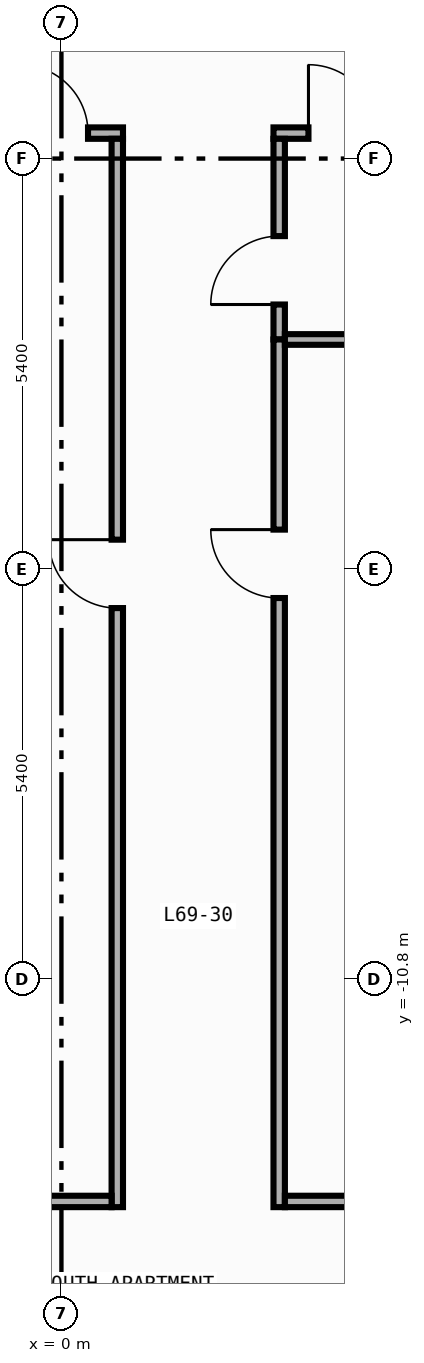
"""IFC4 building model, lengths in metres.
Left out: names, types, materials, properties, quantities, classifications, styles, units other than length and angle.
Written with IfcOpenShell. Run it as: python <this file> out.ifc"""

import sys

from ifc_helpers import new_model, si_unit, direction, frame, frame_2d, origin, place, context, subcontext, project, spatial, rectangle, extrude, element, fill, save


model = new_model("IFC4")
c1 = context("Model", 3, precision=1e-05, world=origin(), true_north=direction((0.0, 1.0)))
c2 = subcontext(c1, "Body", "Model", "MODEL_VIEW")
j1 = project(units=[si_unit("LENGTHUNIT", "METRE"), si_unit("PLANEANGLEUNIT", "RADIAN")], contexts=[c1])
p1 = place(None, origin())
s1 = spatial("IfcSite", under=j1, at=p1, CompositionType="ELEMENT")
p2 = place(p1, origin())
s2 = spatial("IfcBuilding", under=s1, at=p2, CompositionType="ELEMENT")
p3 = place(p2, frame((0.0, 0.0, 289.0)))
s3 = spatial("IfcBuildingStorey", under=s2, at=p3, CompositionType="ELEMENT", Elevation=289.0)
p4 = place(p3, frame((-10.025, 0.335, 0.0), z_axis=(0.0, 0.0, 1.0), x_axis=(1.0, 0.0, 0.0)))
e1 = element("IfcWall", 1, at=p4, inside=s3, PredefinedType="PARTITIONING", context=c2, shape_type="SweptSolid", body=[
    extrude(rectangle(XDim=10.835, YDim=0.15, at=frame_2d((5.417, 0.0))), origin(), (0.0, 0.0, 1.0), 2.64),
])
p5 = place(p4, frame((9.475, 0.0, 0.0)))
e2 = element("IfcOpeningElement", 2, at=p5, cuts=e1, PredefinedType="OPENING", context=c2, shape_type="SweptSolid", body=[
    extrude(rectangle(XDim=0.9, YDim=2.15, at=frame_2d((0.45, 1.075))), frame((0.0, 0.085, 0.0), z_axis=(0.0, -1.0, 0.0), x_axis=(1.0, 0.0, 0.0)), (0.0, 0.0, 1.0), 0.17),
])
p6 = place(p3, frame((2.79, 0.335, 0.0), z_axis=(0.0, 0.0, 1.0), x_axis=(1.0, 0.0, 0.0)))
e3 = element("IfcWall", 3, at=p6, inside=s3, PredefinedType="PARTITIONING", context=c2, shape_type="SweptSolid", body=[
    extrude(rectangle(XDim=3.05, YDim=0.15, at=frame_2d((1.525, 0.0))), origin(), (0.0, 0.0, 1.0), 2.64),
])
p7 = place(p6, frame((0.46, 0.0, 0.0)))
e4 = element("IfcOpeningElement", 4, at=p7, cuts=e3, PredefinedType="OPENING", context=c2, shape_type="SweptSolid", body=[
    extrude(rectangle(XDim=0.9, YDim=2.15, at=frame_2d((0.45, 1.075))), frame((0.0, 0.085, 0.0), z_axis=(0.0, -1.0, 0.0), x_axis=(1.0, 0.0, 0.0)), (0.0, 0.0, 1.0), 0.17),
])
p8 = place(p3, frame((0.735, -13.795, 0.0), z_axis=(0.0, 0.0, 1.0), x_axis=(0.0, 1.0, 0.0)))
e5 = element("IfcWall", 5, at=p8, inside=s3, PredefinedType="PARTITIONING", context=c2, shape_type="SweptSolid", body=[
    extrude(rectangle(XDim=14.055, YDim=0.15, at=frame_2d((7.027, 0.0))), origin(), (0.0, 0.0, 1.0), 3.54),
])
p9 = place(p8, frame((7.881, 0.0, 0.0)))
e6 = element("IfcOpeningElement", 6, at=p9, cuts=e5, PredefinedType="OPENING", context=c2, shape_type="SweptSolid", body=[
    extrude(rectangle(XDim=0.9, YDim=2.15, at=frame_2d((0.45, 1.075))), frame((0.0, 0.085, 0.0), z_axis=(0.0, -1.0, 0.0), x_axis=(1.0, 0.0, 0.0)), (0.0, 0.0, 1.0), 0.17),
])
p10 = place(p3, frame((2.865, -2.38, 0.0), z_axis=(0.0, 0.0, 1.0), x_axis=(0.0, 1.0, 0.0)))
e7 = element("IfcWall", 7, at=p10, inside=s3, PredefinedType="PARTITIONING", context=c2, shape_type="SweptSolid", body=[
    extrude(rectangle(XDim=2.64, YDim=0.15, at=frame_2d((1.32, 0.0))), origin(), (0.0, 0.0, 1.0), 3.54),
])
p11 = place(p10, frame((0.46, 0.0, 0.0)))
e8 = element("IfcOpeningElement", 8, at=p11, cuts=e7, PredefinedType="OPENING", context=c2, shape_type="SweptSolid", body=[
    extrude(rectangle(XDim=0.9, YDim=2.15, at=frame_2d((0.45, 1.075))), frame((0.0, 0.085, 0.0), z_axis=(0.0, -1.0, 0.0), x_axis=(1.0, 0.0, 0.0)), (0.0, 0.0, 1.0), 0.17),
])
p12 = place(p3, frame((2.865, -13.795, 0.0), z_axis=(0.0, 0.0, 1.0), x_axis=(0.0, 1.0, 0.0)))
e9 = element("IfcWall", 9, at=p12, inside=s3, PredefinedType="PARTITIONING", context=c2, shape_type="SweptSolid", body=[
    extrude(rectangle(XDim=11.415, YDim=0.15, at=frame_2d((5.708, 0.0))), origin(), (0.0, 0.0, 1.0), 3.54),
])
p13 = place(p12, frame((8.013, 0.0, 0.0)))
e10 = element("IfcOpeningElement", 10, at=p13, cuts=e9, PredefinedType="OPENING", context=c2, shape_type="SweptSolid", body=[
    extrude(rectangle(XDim=0.9, YDim=2.15, at=frame_2d((0.45, 1.075))), frame((0.0, 0.085, 0.0), z_axis=(0.0, -1.0, 0.0), x_axis=(1.0, 0.0, 0.0)), (0.0, 0.0, 1.0), 0.17),
])
p14 = place(p3, frame((-10.025, -13.72, 0.0), z_axis=(0.0, 0.0, 1.0), x_axis=(1.0, 0.0, 0.0)))
e11 = element("IfcWall", 11, at=p14, inside=s3, PredefinedType="PARTITIONING", context=c2, shape_type="SweptSolid", body=[
    extrude(rectangle(XDim=10.685, YDim=0.15, at=frame_2d((5.342, 0.0))), origin(), (0.0, 0.0, 1.0), 3.54),
])
p15 = place(p14, frame((7.31, 0.0, 0.0)))
e12 = element("IfcOpeningElement", 12, at=p15, cuts=e11, PredefinedType="OPENING", context=c2, shape_type="SweptSolid", body=[
    extrude(rectangle(XDim=0.9, YDim=2.15, at=frame_2d((0.45, 1.075))), frame((0.0, 0.085, 0.0), z_axis=(0.0, -1.0, 0.0), x_axis=(1.0, 0.0, 0.0)), (0.0, 0.0, 1.0), 0.17),
])
p16 = place(p3, frame((2.94, -13.72, 0.0), z_axis=(0.0, 0.0, 1.0), x_axis=(1.0, 0.0, 0.0)))
e13 = element("IfcWall", 13, at=p16, inside=s3, PredefinedType="PARTITIONING", context=c2, shape_type="SweptSolid", body=[
    extrude(rectangle(XDim=7.085, YDim=0.15, at=frame_2d((3.542, 0.0))), origin(), (0.0, 0.0, 1.0), 3.54),
])
p17 = place(p16, frame((2.08, 0.0, 0.0)))
e14 = element("IfcOpeningElement", 14, at=p17, cuts=e13, PredefinedType="OPENING", context=c2, shape_type="SweptSolid", body=[
    extrude(rectangle(XDim=0.9, YDim=2.15, at=frame_2d((0.45, 1.075))), frame((0.0, 0.085, 0.0), z_axis=(0.0, -1.0, 0.0), x_axis=(1.0, 0.0, 0.0)), (0.0, 0.0, 1.0), 0.17),
])
p18 = place(p3, frame((2.94, -2.38, 0.0), z_axis=(0.0, 0.0, 1.0), x_axis=(1.0, 0.0, 0.0)))
e15 = element("IfcWall", 15, at=p18, inside=s3, PredefinedType="PARTITIONING", context=c2, shape_type="SweptSolid", body=[
    extrude(rectangle(XDim=2.9, YDim=0.14, at=frame_2d((1.45, 0.0))), origin(), (0.0, 0.0, 1.0), 3.54),
])
p19 = place(p5, origin())
e16 = element("IfcDoor", 16, at=p19, inside=s3, OperationType="SINGLE_SWING_LEFT", PredefinedType="DOOR", context=c2, shape_type="SweptSolid", body=[
    extrude(rectangle(XDim=0.9, YDim=2.15, at=frame_2d((0.45, 1.075))), frame((0.0, 0.025, 0.0), z_axis=(0.0, -1.0, 0.0), x_axis=(1.0, 0.0, 0.0)), (0.0, 0.0, 1.0), 0.05),
])
fill(e2, e16)
p20 = place(p7, origin())
e17 = element("IfcDoor", 17, at=p20, inside=s3, OperationType="SINGLE_SWING_LEFT", PredefinedType="DOOR", context=c2, shape_type="SweptSolid", body=[
    extrude(rectangle(XDim=0.9, YDim=2.15, at=frame_2d((0.45, 1.075))), frame((0.0, 0.025, 0.0), z_axis=(0.0, -1.0, 0.0), x_axis=(1.0, 0.0, 0.0)), (0.0, 0.0, 1.0), 0.05),
])
fill(e4, e17)
p21 = place(p9, origin())
e18 = element("IfcDoor", 18, at=p21, inside=s3, OperationType="SINGLE_SWING_RIGHT", PredefinedType="DOOR", context=c2, shape_type="SweptSolid", body=[
    extrude(rectangle(XDim=0.9, YDim=2.15, at=frame_2d((0.45, 1.075))), frame((0.0, 0.025, 0.0), z_axis=(0.0, -1.0, 0.0), x_axis=(1.0, 0.0, 0.0)), (0.0, 0.0, 1.0), 0.05),
])
fill(e6, e18)
p22 = place(p11, origin())
e19 = element("IfcDoor", 19, at=p22, inside=s3, OperationType="SINGLE_SWING_LEFT", PredefinedType="DOOR", context=c2, shape_type="SweptSolid", body=[
    extrude(rectangle(XDim=0.9, YDim=2.15, at=frame_2d((0.45, 1.075))), frame((0.0, 0.025, 0.0), z_axis=(0.0, -1.0, 0.0), x_axis=(1.0, 0.0, 0.0)), (0.0, 0.0, 1.0), 0.05),
])
fill(e8, e19)
p23 = place(p13, origin())
e20 = element("IfcDoor", 20, at=p23, inside=s3, OperationType="SINGLE_SWING_RIGHT", PredefinedType="DOOR", context=c2, shape_type="SweptSolid", body=[
    extrude(rectangle(XDim=0.9, YDim=2.15, at=frame_2d((0.45, 1.075))), frame((0.0, 0.025, 0.0), z_axis=(0.0, -1.0, 0.0), x_axis=(1.0, 0.0, 0.0)), (0.0, 0.0, 1.0), 0.05),
])
fill(e10, e20)
save(model, sys.argv[1])
